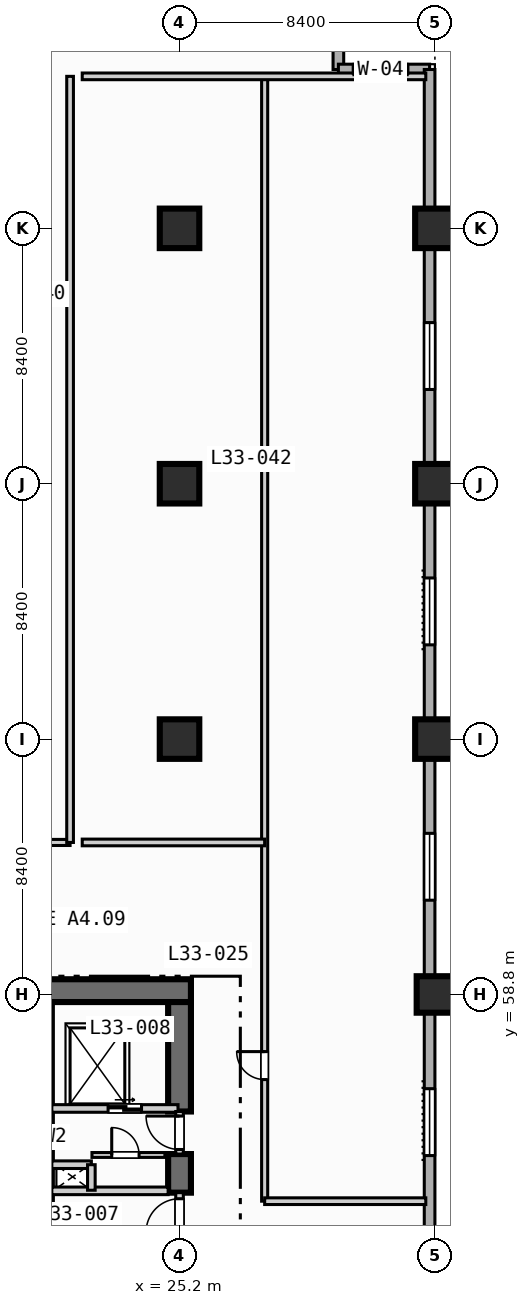
"""IFC4 building model, lengths in metres.
Left out: names, types, materials, properties, quantities, classifications, styles, units other than length and angle.
Written with IfcOpenShell. Run it as: python <this file> out.ifc"""

import sys

from ifc_helpers import new_model, si_unit, direction, frame, frame_2d, origin, origin_2d, place, context, subcontext, project, spatial, rectangle, extrude, element, fill, save


model = new_model("IFC4")
c1 = context("Model", 3, precision=1e-05, world=origin(), true_north=direction((0.0, 1.0)))
c2 = subcontext(c1, "Body", "Model", "MODEL_VIEW")
j1 = project(units=[si_unit("LENGTHUNIT", "METRE"), si_unit("PLANEANGLEUNIT", "RADIAN")], contexts=[c1])
p1 = place(None, origin())
s1 = spatial("IfcSite", under=j1, at=p1, CompositionType="ELEMENT")
p2 = place(p1, origin())
s2 = spatial("IfcBuilding", under=s1, at=p2, CompositionType="ELEMENT")
p3 = place(p2, frame((0.0, 0.0, 138.0)))
s3 = spatial("IfcBuildingStorey", under=s2, at=p3, CompositionType="ELEMENT", Elevation=138.0)
p4 = place(p3, frame((20.5, 58.925, 0.0), z_axis=(0.0, 0.0, 1.0), x_axis=(1.0, 0.0, 0.0)))
e1 = element("IfcWall", 1, at=p4, inside=s3, PredefinedType="SHEAR", context=c2, shape_type="SweptSolid", body=[
    extrude(rectangle(XDim=5.075, YDim=0.75, at=frame_2d((2.538, 0.0))), origin(), (0.0, 0.0, 1.0), 3.55),
])
p5 = place(p3, frame((25.2, 52.28, 0.0), z_axis=(0.0, 0.0, 1.0), x_axis=(0.0, 1.0, 0.0)))
e2 = element("IfcWall", 2, at=p5, inside=s3, PredefinedType="SHEAR", context=c2, shape_type="SweptSolid", body=[
    extrude(rectangle(XDim=1.27, YDim=0.75, at=frame_2d((0.635, 0.0))), origin(), (0.0, 0.0, 1.0), 3.55),
])
p6 = place(p3, frame((25.2, 54.95, 0.0), z_axis=(0.0, 0.0, 1.0), x_axis=(0.0, 1.0, 0.0)))
e3 = element("IfcWall", 3, at=p6, inside=s3, PredefinedType="SHEAR", context=c2, shape_type="SweptSolid", body=[
    extrude(rectangle(XDim=3.6, YDim=0.75, at=frame_2d((1.8, 0.0))), origin(), (0.0, 0.0, 1.0), 3.55),
])
for number, where, z_axis, x_axis in (
    (4, (25.2, 67.2, 0.0), (0.0, 0.0, 1.0), (1.0, 0.0, 0.0)),
    (5, (25.2, 75.6, 0.0), (0.0, 0.0, 1.0), (1.0, 0.0, 0.0)),
    (6, (25.2, 84.0, 0.0), (0.0, 0.0, 1.0), (1.0, 0.0, 0.0)),
):
    element("IfcColumn", number, at=place(p3, frame(where, z_axis=z_axis, x_axis=x_axis)), inside=s3, PredefinedType="COLUMN", context=c2, shape_type="SweptSolid", body=[
        extrude(rectangle(XDim=1.3, YDim=1.3, at=origin_2d()), origin(), (0.0, 0.0, 1.0), 3.8),
    ])
p7 = place(p3, frame((33.6, 58.8, 0.0), z_axis=(0.0, 0.0, 1.0), x_axis=(1.0, 0.0, 0.0)))
e7 = element("IfcColumn", 7, at=p7, inside=s3, PredefinedType="COLUMN", context=c2, shape_type="SweptSolid", body=[
    extrude(rectangle(XDim=1.2, YDim=1.2, at=origin_2d()), origin(), (0.0, 0.0, 1.0), 3.8),
])
for number, where, z_axis, x_axis in (
    (8, (33.6, 67.2, 0.0), (0.0, 0.0, 1.0), (1.0, 0.0, 0.0)),
    (9, (33.6, 75.6, 0.0), (0.0, 0.0, 1.0), (1.0, 0.0, 0.0)),
    (10, (33.6, 84.0, 0.0), (0.0, 0.0, 1.0), (1.0, 0.0, 0.0)),
):
    element("IfcColumn", number, at=place(p3, frame(where, z_axis=z_axis, x_axis=x_axis)), inside=s3, PredefinedType="COLUMN", context=c2, shape_type="SweptSolid", body=[
        extrude(rectangle(XDim=1.3, YDim=1.3, at=origin_2d()), origin(), (0.0, 0.0, 1.0), 3.8),
    ])
p8 = place(p3, frame((30.425, 92.225, 0.0), z_axis=(0.0, 0.0, 1.0), x_axis=(0.0, -1.0, 0.0)))
e11 = element("IfcWall", 11, at=p8, inside=s3, PredefinedType="STANDARD", context=c2, shape_type="SweptSolid", body=[
    extrude(rectangle(XDim=3.0, YDim=0.35, at=frame_2d((1.5, 0.0))), origin(), (0.0, 0.0, 1.0), 3.55),
])
p9 = place(p3, frame((30.425, 89.225, 0.0), z_axis=(0.0, 0.0, 1.0), x_axis=(1.0, 0.0, 0.0)))
e12 = element("IfcWall", 12, at=p9, inside=s3, PredefinedType="STANDARD", context=c2, shape_type="SweptSolid", body=[
    extrude(rectangle(XDim=3.0, YDim=0.35, at=frame_2d((1.5, 0.0))), origin(), (0.0, 0.0, 1.0), 3.55),
])
p10 = place(p9, frame((0.488, 0.0, 0.85)))
e13 = element("IfcOpeningElement", 13, at=p10, cuts=e12, PredefinedType="OPENING", context=c2, shape_type="SweptSolid", body=[
    extrude(rectangle(XDim=1.8, YDim=1.8, at=frame_2d((0.9, 0.9))), frame((0.0, 0.185, 0.0), z_axis=(0.0, -1.0, 0.0), x_axis=(1.0, 0.0, 0.0)), (0.0, 0.0, 1.0), 0.37),
])
p11 = place(p3, frame((33.425, 89.225, 0.0), z_axis=(0.0, 0.0, 1.0), x_axis=(0.0, -1.0, 0.0)))
e14 = element("IfcWall", 14, at=p11, inside=s3, PredefinedType="STANDARD", context=c2, shape_type="SweptSolid", body=[
    extrude(rectangle(XDim=55.8, YDim=0.35, at=frame_2d((27.9, 0.0))), origin(), (0.0, 0.0, 1.0), 3.55),
])
p12 = place(p11, frame((50.325, 0.0, 0.85)))
e15 = element("IfcOpeningElement", 15, at=p12, cuts=e14, PredefinedType="OPENING", context=c2, shape_type="SweptSolid", body=[
    extrude(rectangle(XDim=2.2, YDim=1.8, at=frame_2d((1.1, 0.9))), frame((0.0, 0.185, 0.0), z_axis=(0.0, -1.0, 0.0), x_axis=(1.0, 0.0, 0.0)), (0.0, 0.0, 1.0), 0.37),
])
p13 = place(p11, frame((33.525, 0.0, 0.85)))
e16 = element("IfcOpeningElement", 16, at=p13, cuts=e14, PredefinedType="OPENING", context=c2, shape_type="SweptSolid", body=[
    extrude(rectangle(XDim=2.2, YDim=1.8, at=frame_2d((1.1, 0.9))), frame((0.0, 0.185, 0.0), z_axis=(0.0, -1.0, 0.0), x_axis=(1.0, 0.0, 0.0)), (0.0, 0.0, 1.0), 0.37),
])
p14 = place(p11, frame((25.125, 0.0, 0.85)))
e17 = element("IfcOpeningElement", 17, at=p14, cuts=e14, PredefinedType="OPENING", context=c2, shape_type="SweptSolid", body=[
    extrude(rectangle(XDim=2.2, YDim=1.8, at=frame_2d((1.1, 0.9))), frame((0.0, 0.185, 0.0), z_axis=(0.0, -1.0, 0.0), x_axis=(1.0, 0.0, 0.0)), (0.0, 0.0, 1.0), 0.37),
])
p15 = place(p11, frame((16.725, 0.0, 0.85)))
e18 = element("IfcOpeningElement", 18, at=p15, cuts=e14, PredefinedType="OPENING", context=c2, shape_type="SweptSolid", body=[
    extrude(rectangle(XDim=2.2, YDim=1.8, at=frame_2d((1.1, 0.9))), frame((0.0, 0.185, 0.0), z_axis=(0.0, -1.0, 0.0), x_axis=(1.0, 0.0, 0.0)), (0.0, 0.0, 1.0), 0.37),
])
p16 = place(p11, frame((8.325, 0.0, 0.85)))
e19 = element("IfcOpeningElement", 19, at=p16, cuts=e14, PredefinedType="OPENING", context=c2, shape_type="SweptSolid", body=[
    extrude(rectangle(XDim=2.2, YDim=1.8, at=frame_2d((1.1, 0.9))), frame((0.0, 0.185, 0.0), z_axis=(0.0, -1.0, 0.0), x_axis=(1.0, 0.0, 0.0)), (0.0, 0.0, 1.0), 0.37),
])
p17 = place(p3, frame((25.2, 50.8, 0.0), z_axis=(0.0, 0.0, 1.0), x_axis=(0.0, 1.0, 0.0)))
e20 = element("IfcWall", 20, at=p17, inside=s3, PredefinedType="SOLIDWALL", context=c2, shape_type="SweptSolid", body=[
    extrude(rectangle(XDim=1.48, YDim=0.25, at=frame_2d((0.74, 0.0))), origin(), (0.0, 0.0, 1.0), 3.55),
])
p18 = place(p17, frame((0.18, 0.0, 0.0)))
e21 = element("IfcOpeningElement", 21, at=p18, cuts=e20, PredefinedType="OPENING", context=c2, shape_type="SweptSolid", body=[
    extrude(rectangle(XDim=1.1, YDim=2.15, at=frame_2d((0.55, 1.075))), frame((0.0, 0.135, 0.0), z_axis=(0.0, -1.0, 0.0), x_axis=(1.0, 0.0, 0.0)), (0.0, 0.0, 1.0), 0.27),
])
p19 = place(p3, frame((21.0, 52.34, 0.0), z_axis=(0.0, 0.0, 1.0), x_axis=(1.0, 0.0, 0.0)))
e22 = element("IfcWall", 22, at=p19, inside=s3, PredefinedType="SOLIDWALL", context=c2, shape_type="SweptSolid", body=[
    extrude(rectangle(XDim=3.825, YDim=0.25, at=frame_2d((1.913, 0.0))), origin(), (0.0, 0.0, 1.0), 3.55),
])
p20 = place(p3, frame((21.0, 55.05, 0.0), z_axis=(0.0, 0.0, 1.0), x_axis=(1.0, 0.0, 0.0)))
e23 = element("IfcWall", 23, at=p20, inside=s3, PredefinedType="SOLIDWALL", context=c2, shape_type="SweptSolid", body=[
    extrude(rectangle(XDim=4.15, YDim=0.25, at=frame_2d((2.075, 0.0))), origin(), (0.0, 0.0, 1.0), 3.55),
])
p21 = place(p20, frame((1.85, 0.0, 0.0)))
e24 = element("IfcOpeningElement", 24, at=p21, cuts=e23, PredefinedType="OPENING", context=c2, shape_type="SweptSolid", body=[
    extrude(rectangle(XDim=1.1, YDim=2.15, at=frame_2d((0.55, 1.075))), frame((0.0, 0.135, 0.0), z_axis=(0.0, -1.0, 0.0), x_axis=(1.0, 0.0, 0.0)), (0.0, 0.0, 1.0), 0.27),
])
p22 = place(p3, frame((25.2, 53.55, 0.0), z_axis=(0.0, 0.0, 1.0), x_axis=(0.0, 1.0, 0.0)))
e25 = element("IfcWall", 25, at=p22, inside=s3, PredefinedType="SOLIDWALL", context=c2, shape_type="SweptSolid", body=[
    extrude(rectangle(XDim=1.4, YDim=0.25, at=frame_2d((0.7, 0.0))), origin(), (0.0, 0.0, 1.0), 3.55),
])
p23 = place(p22, frame((0.15, 0.0, 0.0)))
e26 = element("IfcOpeningElement", 26, at=p23, cuts=e25, PredefinedType="OPENING", context=c2, shape_type="SweptSolid", body=[
    extrude(rectangle(XDim=1.1, YDim=2.15, at=frame_2d((0.55, 1.075))), frame((0.0, 0.135, 0.0), z_axis=(0.0, -1.0, 0.0), x_axis=(1.0, 0.0, 0.0)), (0.0, 0.0, 1.0), 0.27),
])
p24 = place(p3, frame((21.0, 53.2, 0.0), z_axis=(0.0, 0.0, 1.0), x_axis=(1.0, 0.0, 0.0)))
e27 = element("IfcWall", 27, at=p24, inside=s3, PredefinedType="SOLIDWALL", context=c2, shape_type="SweptSolid", body=[
    extrude(rectangle(XDim=1.3, YDim=0.25, at=frame_2d((0.65, 0.0))), origin(), (0.0, 0.0, 1.0), 3.55),
])
p25 = place(p3, frame((22.3, 52.36, 0.0), z_axis=(0.0, 0.0, 1.0), x_axis=(0.0, 1.0, 0.0)))
e28 = element("IfcWall", 28, at=p25, inside=s3, PredefinedType="SOLIDWALL", context=c2, shape_type="SweptSolid", body=[
    extrude(rectangle(XDim=0.84, YDim=0.25, at=frame_2d((0.42, 0.0))), origin(), (0.0, 0.0, 1.0), 3.55),
])
p26 = place(p3, frame((22.32, 53.52, 0.0), z_axis=(0.0, 0.0, 1.0), x_axis=(1.0, 0.0, 0.0)))
e29 = element("IfcWall", 29, at=p26, inside=s3, PredefinedType="PARTITIONING", context=c2, shape_type="SweptSolid", body=[
    extrude(rectangle(XDim=2.4, YDim=0.16, at=frame_2d((1.2, 0.0))), origin(), (0.0, 0.0, 1.0), 3.55),
])
p27 = place(p26, frame((0.65, 0.0, 0.0)))
e30 = element("IfcOpeningElement", 30, at=p27, cuts=e29, PredefinedType="OPENING", context=c2, shape_type="SweptSolid", body=[
    extrude(rectangle(XDim=0.9, YDim=2.1, at=frame_2d((0.45, 1.05))), frame((0.0, 0.09, 0.0), z_axis=(0.0, -1.0, 0.0), x_axis=(1.0, 0.0, 0.0)), (0.0, 0.0, 1.0), 0.18),
])
p28 = place(p3, frame((3.4, 63.8, 0.0), z_axis=(0.0, 0.0, 1.0), x_axis=(1.0, 0.0, 0.0)))
e31 = element("IfcWall", 31, at=p28, inside=s3, PredefinedType="PARTITIONING", context=c2, shape_type="SweptSolid", body=[
    extrude(rectangle(XDim=18.2, YDim=0.2, at=frame_2d((9.1, 0.0))), origin(), (0.0, 0.0, 1.0), 3.55),
])
p29 = place(p28, frame((4.05, 0.0, 0.0)))
e32 = element("IfcOpeningElement", 32, at=p29, cuts=e31, PredefinedType="OPENING", context=c2, shape_type="SweptSolid", body=[
    extrude(rectangle(XDim=1.0, YDim=2.15, at=frame_2d((0.5, 1.075))), frame((0.0, 0.11, 0.0), z_axis=(0.0, -1.0, 0.0), x_axis=(1.0, 0.0, 0.0)), (0.0, 0.0, 1.0), 0.22),
])
p30 = place(p3, frame((21.6, 63.8, 0.0), z_axis=(0.0, 0.0, 1.0), x_axis=(0.0, 1.0, 0.0)))
e33 = element("IfcWall", 33, at=p30, inside=s3, PredefinedType="PARTITIONING", context=c2, shape_type="SweptSolid", body=[
    extrude(rectangle(XDim=25.2, YDim=0.22, at=frame_2d((12.6, 0.0))), origin(), (0.0, 0.0, 1.0), 3.55),
])
p31 = place(p3, frame((28.0, 52.0, 0.0), z_axis=(0.0, 0.0, 1.0), x_axis=(0.0, 1.0, 0.0)))
e34 = element("IfcWall", 34, at=p31, inside=s3, PredefinedType="PARTITIONING", context=c2, shape_type="SweptSolid", body=[
    extrude(rectangle(XDim=37.0, YDim=0.2, at=frame_2d((18.5, 0.0))), origin(), (0.0, 0.0, 1.0), 3.55),
])
p32 = place(p31, frame((4.0, 0.0, 0.0)))
e35 = element("IfcOpeningElement", 35, at=p32, cuts=e34, PredefinedType="OPENING", context=c2, shape_type="SweptSolid", body=[
    extrude(rectangle(XDim=0.92, YDim=2.1, at=frame_2d((0.46, 1.05))), frame((0.0, 0.11, 0.0), z_axis=(0.0, -1.0, 0.0), x_axis=(1.0, 0.0, 0.0)), (0.0, 0.0, 1.0), 0.22),
])
p33 = place(p3, frame((28.0, 52.0, 0.0), z_axis=(0.0, 0.0, 1.0), x_axis=(1.0, 0.0, 0.0)))
e36 = element("IfcWall", 36, at=p33, inside=s3, PredefinedType="PARTITIONING", context=c2, shape_type="SweptSolid", body=[
    extrude(rectangle(XDim=5.3, YDim=0.22, at=frame_2d((2.65, 0.0))), origin(), (0.0, 0.0, 1.0), 3.55),
])
p34 = place(p3, frame((22.0, 89.0, 0.0), z_axis=(0.0, 0.0, 1.0), x_axis=(1.0, 0.0, 0.0)))
e37 = element("IfcWall", 37, at=p34, inside=s3, PredefinedType="PARTITIONING", context=c2, shape_type="SweptSolid", body=[
    extrude(rectangle(XDim=11.3, YDim=0.22, at=frame_2d((5.65, 0.0))), origin(), (0.0, 0.0, 1.0), 3.55),
])
p35 = place(p3, frame((22.0, 63.8, 0.0), z_axis=(0.0, 0.0, 1.0), x_axis=(1.0, 0.0, 0.0)))
e38 = element("IfcWall", 38, at=p35, inside=s3, PredefinedType="PARTITIONING", context=c2, shape_type="SweptSolid", body=[
    extrude(rectangle(XDim=6.0, YDim=0.22, at=frame_2d((3.0, 0.0))), origin(), (0.0, 0.0, 1.0), 3.55),
])
p36 = place(p10, origin())
e39 = element("IfcWindow", 39, at=p36, inside=s3, PartitioningType="SINGLE_PANEL", PredefinedType="WINDOW", context=c2, shape_type="SweptSolid", body=[
    extrude(rectangle(XDim=1.8, YDim=1.8, at=frame_2d((0.9, 0.9))), frame((0.0, 0.03, 0.0), z_axis=(0.0, -1.0, 0.0), x_axis=(1.0, 0.0, 0.0)), (0.0, 0.0, 1.0), 0.06),
])
fill(e13, e39)
p37 = place(p13, origin())
e40 = element("IfcWindow", 40, at=p37, inside=s3, PartitioningType="SINGLE_PANEL", PredefinedType="WINDOW", context=c2, shape_type="SweptSolid", body=[
    extrude(rectangle(XDim=2.2, YDim=1.8, at=frame_2d((1.1, 0.9))), frame((0.0, 0.03, 0.0), z_axis=(0.0, -1.0, 0.0), x_axis=(1.0, 0.0, 0.0)), (0.0, 0.0, 1.0), 0.06),
])
fill(e16, e40)
p38 = place(p14, origin())
e41 = element("IfcWindow", 41, at=p38, inside=s3, PartitioningType="SINGLE_PANEL", PredefinedType="WINDOW", context=c2, shape_type="SweptSolid", body=[
    extrude(rectangle(XDim=2.2, YDim=1.8, at=frame_2d((1.1, 0.9))), frame((0.0, 0.03, 0.0), z_axis=(0.0, -1.0, 0.0), x_axis=(1.0, 0.0, 0.0)), (0.0, 0.0, 1.0), 0.06),
])
fill(e17, e41)
p39 = place(p15, origin())
e42 = element("IfcWindow", 42, at=p39, inside=s3, PartitioningType="SINGLE_PANEL", PredefinedType="WINDOW", context=c2, shape_type="SweptSolid", body=[
    extrude(rectangle(XDim=2.2, YDim=1.8, at=frame_2d((1.1, 0.9))), frame((0.0, 0.03, 0.0), z_axis=(0.0, -1.0, 0.0), x_axis=(1.0, 0.0, 0.0)), (0.0, 0.0, 1.0), 0.06),
])
fill(e18, e42)
p40 = place(p16, origin())
e43 = element("IfcWindow", 43, at=p40, inside=s3, PartitioningType="SINGLE_PANEL", PredefinedType="WINDOW", context=c2, shape_type="SweptSolid", body=[
    extrude(rectangle(XDim=2.2, YDim=1.8, at=frame_2d((1.1, 0.9))), frame((0.0, 0.03, 0.0), z_axis=(0.0, -1.0, 0.0), x_axis=(1.0, 0.0, 0.0)), (0.0, 0.0, 1.0), 0.06),
])
fill(e19, e43)
p41 = place(p18, origin())
e44 = element("IfcDoor", 44, at=p41, inside=s3, OperationType="SINGLE_SWING_LEFT", PredefinedType="DOOR", context=c2, shape_type="SweptSolid", body=[
    extrude(rectangle(XDim=1.1, YDim=2.15, at=frame_2d((0.55, 1.075))), frame((0.0, 0.025, 0.0), z_axis=(0.0, -1.0, 0.0), x_axis=(1.0, 0.0, 0.0)), (0.0, 0.0, 1.0), 0.05),
])
fill(e21, e44)
p42 = place(p21, origin())
e45 = element("IfcDoor", 45, at=p42, inside=s3, OperationType="SLIDING_TO_LEFT", PredefinedType="DOOR", context=c2, shape_type="SweptSolid", body=[
    extrude(rectangle(XDim=1.1, YDim=2.15, at=frame_2d((0.55, 1.075))), frame((0.0, 0.025, 0.0), z_axis=(0.0, -1.0, 0.0), x_axis=(1.0, 0.0, 0.0)), (0.0, 0.0, 1.0), 0.05),
])
fill(e24, e45)
p43 = place(p23, origin())
e46 = element("IfcDoor", 46, at=p43, inside=s3, OperationType="SINGLE_SWING_RIGHT", PredefinedType="DOOR", context=c2, shape_type="SweptSolid", body=[
    extrude(rectangle(XDim=1.1, YDim=2.15, at=frame_2d((0.55, 1.075))), frame((0.0, 0.025, 0.0), z_axis=(0.0, -1.0, 0.0), x_axis=(1.0, 0.0, 0.0)), (0.0, 0.0, 1.0), 0.05),
])
fill(e26, e46)
p44 = place(p27, origin())
e47 = element("IfcDoor", 47, at=p44, inside=s3, OperationType="SINGLE_SWING_LEFT", PredefinedType="DOOR", context=c2, shape_type="SweptSolid", body=[
    extrude(rectangle(XDim=0.9, YDim=2.1, at=frame_2d((0.45, 1.05))), frame((0.0, 0.025, 0.0), z_axis=(0.0, -1.0, 0.0), x_axis=(1.0, 0.0, 0.0)), (0.0, 0.0, 1.0), 0.05),
])
fill(e30, e47)
p45 = place(p32, origin())
e48 = element("IfcDoor", 48, at=p45, inside=s3, OperationType="SINGLE_SWING_RIGHT", PredefinedType="DOOR", context=c2, shape_type="SweptSolid", body=[
    extrude(rectangle(XDim=0.92, YDim=2.1, at=frame_2d((0.46, 1.05))), frame((0.0, 0.025, 0.0), z_axis=(0.0, -1.0, 0.0), x_axis=(1.0, 0.0, 0.0)), (0.0, 0.0, 1.0), 0.05),
])
fill(e35, e48)
save(model, sys.argv[1])
